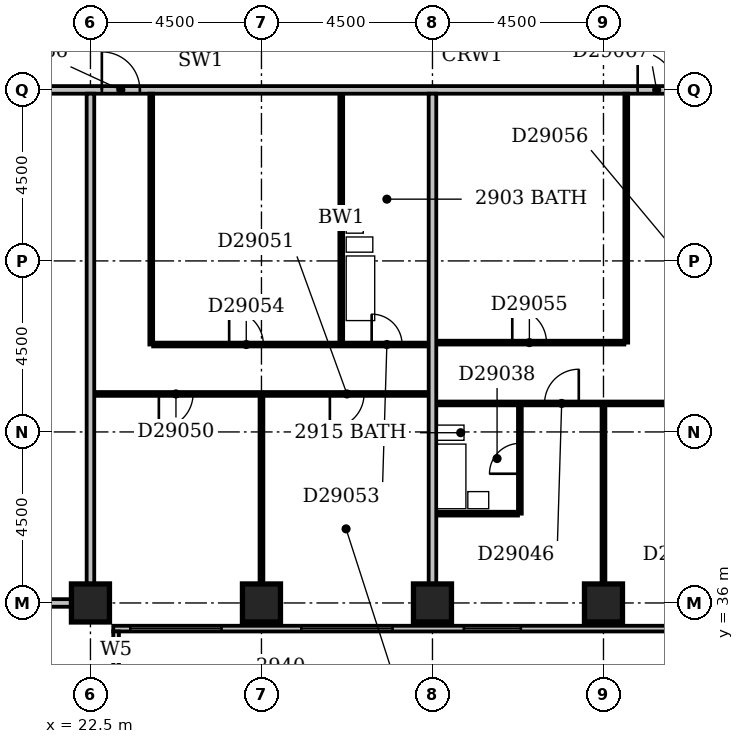
"""IFC4 building model, lengths in metres.
Left out: names, types, materials, properties, quantities, classifications, styles, units other than length and angle.
Written with IfcOpenShell. Run it as: python <this file> out.ifc"""

import sys

from ifc_helpers import new_model, si_unit, direction, frame, frame_2d, origin, origin_2d, place, context, subcontext, project, spatial, rectangle, extrude, element, fill, save


model = new_model("IFC4")
c1 = context("Model", 3, precision=1e-05, world=origin(), true_north=direction((0.0, 1.0)))
c2 = subcontext(c1, "Body", "Model", "MODEL_VIEW")
j1 = project(units=[si_unit("LENGTHUNIT", "METRE"), si_unit("PLANEANGLEUNIT", "RADIAN")], contexts=[c1])
p1 = place(None, origin())
s1 = spatial("IfcSite", under=j1, at=p1, CompositionType="ELEMENT")
p2 = place(p1, origin())
s2 = spatial("IfcBuilding", under=s1, at=p2, CompositionType="ELEMENT")
p3 = place(p2, frame((0.0, 0.0, 119.6)))
s3 = spatial("IfcBuildingStorey", under=s2, at=p3, CompositionType="ELEMENT", Elevation=119.6)
for number, where, z_axis, x_axis in (
    (1, (22.5, 36.0, -0.3), (0.0, 0.0, 1.0), (1.0, 0.0, 0.0)),
    (2, (27.0, 36.0, -0.3), (0.0, 0.0, 1.0), (1.0, 0.0, 0.0)),
    (3, (31.5, 36.0, -0.3), (0.0, 0.0, 1.0), (1.0, 0.0, 0.0)),
    (4, (36.0, 36.0, -0.3), (0.0, 0.0, 1.0), (1.0, 0.0, 0.0)),
):
    element("IfcColumn", number, at=place(p3, frame(where, z_axis=z_axis, x_axis=x_axis)), inside=s3, PredefinedType="COLUMN", context=c2, shape_type="SweptSolid", body=[
        extrude(rectangle(XDim=1.0, YDim=1.0, at=origin_2d()), origin(), (0.0, 0.0, 1.0), 3.6),
    ])
p4 = place(p3, frame((23.175, 17.4, 0.0), z_axis=(0.0, 0.0, 1.0), x_axis=(0.0, 1.0, 0.0)))
e5 = element("IfcWall", 5, at=p4, inside=s3, PredefinedType="STANDARD", context=c2, shape_type="SweptSolid", body=[
    extrude(rectangle(XDim=17.85, YDim=0.15, at=frame_2d((8.925, 0.0))), origin(), (0.0, 0.0, 1.0), 2.7),
])
p5 = place(p4, frame((1.65, 0.0, 0.6)))
e6 = element("IfcOpeningElement", 6, at=p5, cuts=e5, PredefinedType="OPENING", context=c2, shape_type="SweptSolid", body=[
    extrude(rectangle(XDim=2.4, YDim=1.8, at=frame_2d((1.2, 0.9))), frame((0.0, 0.087, 0.0), z_axis=(0.0, -1.0, 0.0), x_axis=(1.0, 0.0, 0.0)), (0.0, 0.0, 1.0), 0.174),
])
p6 = place(p4, frame((6.15, 0.0, 0.6)))
e7 = element("IfcOpeningElement", 7, at=p6, cuts=e5, PredefinedType="OPENING", context=c2, shape_type="SweptSolid", body=[
    extrude(rectangle(XDim=2.4, YDim=1.8, at=frame_2d((1.2, 0.9))), frame((0.0, 0.087, 0.0), z_axis=(0.0, -1.0, 0.0), x_axis=(1.0, 0.0, 0.0)), (0.0, 0.0, 1.0), 0.174),
])
p7 = place(p4, frame((10.65, 0.0, 0.6)))
e8 = element("IfcOpeningElement", 8, at=p7, cuts=e5, PredefinedType="OPENING", context=c2, shape_type="SweptSolid", body=[
    extrude(rectangle(XDim=2.4, YDim=1.8, at=frame_2d((1.2, 0.9))), frame((0.0, 0.087, 0.0), z_axis=(0.0, -1.0, 0.0), x_axis=(1.0, 0.0, 0.0)), (0.0, 0.0, 1.0), 0.174),
])
p8 = place(p4, frame((17.13, 0.0, 0.6)))
e9 = element("IfcOpeningElement", 9, at=p8, cuts=e5, PredefinedType="OPENING", context=c2, shape_type="SweptSolid", body=[
    extrude(rectangle(XDim=0.45, YDim=1.8, at=frame_2d((0.225, 0.9))), frame((0.0, 0.087, 0.0), z_axis=(0.0, -1.0, 0.0), x_axis=(1.0, 0.0, 0.0)), (0.0, 0.0, 1.0), 0.174),
])
p9 = place(p3, frame((23.1, 35.325, 0.0), z_axis=(0.0, 0.0, 1.0), x_axis=(1.0, 0.0, 0.0)))
e10 = element("IfcWall", 10, at=p9, inside=s3, PredefinedType="STANDARD", context=c2, shape_type="SweptSolid", body=[
    extrude(rectangle(XDim=45.15, YDim=0.15, at=frame_2d((22.575, 0.0))), origin(), (0.0, 0.0, 1.0), 2.7),
])
p10 = place(p9, frame((0.45, 0.0, 0.6)))
e11 = element("IfcOpeningElement", 11, at=p10, cuts=e10, PredefinedType="OPENING", context=c2, shape_type="SweptSolid", body=[
    extrude(rectangle(XDim=2.4, YDim=1.8, at=frame_2d((1.2, 0.9))), frame((0.0, 0.087, 0.0), z_axis=(0.0, -1.0, 0.0), x_axis=(1.0, 0.0, 0.0)), (0.0, 0.0, 1.0), 0.174),
])
p11 = place(p9, frame((4.95, 0.0, 0.6)))
e12 = element("IfcOpeningElement", 12, at=p11, cuts=e10, PredefinedType="OPENING", context=c2, shape_type="SweptSolid", body=[
    extrude(rectangle(XDim=2.4, YDim=1.8, at=frame_2d((1.2, 0.9))), frame((0.0, 0.087, 0.0), z_axis=(0.0, -1.0, 0.0), x_axis=(1.0, 0.0, 0.0)), (0.0, 0.0, 1.0), 0.174),
])
p12 = place(p9, frame((9.225, 0.0, 0.6)))
e13 = element("IfcOpeningElement", 13, at=p12, cuts=e10, PredefinedType="OPENING", context=c2, shape_type="SweptSolid", body=[
    extrude(rectangle(XDim=1.5, YDim=1.8, at=frame_2d((0.75, 0.9))), frame((0.0, 0.087, 0.0), z_axis=(0.0, -1.0, 0.0), x_axis=(1.0, 0.0, 0.0)), (0.0, 0.0, 1.0), 0.174),
])
p13 = place(p9, frame((15.146, 0.0, 0.6)))
e14 = element("IfcOpeningElement", 14, at=p13, cuts=e10, PredefinedType="OPENING", context=c2, shape_type="SweptSolid", body=[
    extrude(rectangle(XDim=1.5, YDim=1.8, at=frame_2d((0.75, 0.9))), frame((0.0, 0.087, 0.0), z_axis=(0.0, -1.0, 0.0), x_axis=(1.0, 0.0, 0.0)), (0.0, 0.0, 1.0), 0.174),
])
p14 = place(p9, frame((18.45, 0.0, 0.6)))
e15 = element("IfcOpeningElement", 15, at=p14, cuts=e10, PredefinedType="OPENING", context=c2, shape_type="SweptSolid", body=[
    extrude(rectangle(XDim=2.4, YDim=1.8, at=frame_2d((1.2, 0.9))), frame((0.0, 0.087, 0.0), z_axis=(0.0, -1.0, 0.0), x_axis=(1.0, 0.0, 0.0)), (0.0, 0.0, 1.0), 0.174),
])
p15 = place(p9, frame((22.95, 0.0, 0.6)))
e16 = element("IfcOpeningElement", 16, at=p15, cuts=e10, PredefinedType="OPENING", context=c2, shape_type="SweptSolid", body=[
    extrude(rectangle(XDim=2.4, YDim=1.8, at=frame_2d((1.2, 0.9))), frame((0.0, 0.087, 0.0), z_axis=(0.0, -1.0, 0.0), x_axis=(1.0, 0.0, 0.0)), (0.0, 0.0, 1.0), 0.174),
])
p16 = place(p9, frame((27.45, 0.0, 0.6)))
e17 = element("IfcOpeningElement", 17, at=p16, cuts=e10, PredefinedType="OPENING", context=c2, shape_type="SweptSolid", body=[
    extrude(rectangle(XDim=2.4, YDim=1.8, at=frame_2d((1.2, 0.9))), frame((0.0, 0.087, 0.0), z_axis=(0.0, -1.0, 0.0), x_axis=(1.0, 0.0, 0.0)), (0.0, 0.0, 1.0), 0.174),
])
p17 = place(p9, frame((31.95, 0.0, 0.6)))
e18 = element("IfcOpeningElement", 18, at=p17, cuts=e10, PredefinedType="OPENING", context=c2, shape_type="SweptSolid", body=[
    extrude(rectangle(XDim=2.4, YDim=1.8, at=frame_2d((1.2, 0.9))), frame((0.0, 0.087, 0.0), z_axis=(0.0, -1.0, 0.0), x_axis=(1.0, 0.0, 0.0)), (0.0, 0.0, 1.0), 0.174),
])
p18 = place(p9, frame((36.45, 0.0, 0.6)))
e19 = element("IfcOpeningElement", 19, at=p18, cuts=e10, PredefinedType="OPENING", context=c2, shape_type="SweptSolid", body=[
    extrude(rectangle(XDim=2.4, YDim=1.8, at=frame_2d((1.2, 0.9))), frame((0.0, 0.087, 0.0), z_axis=(0.0, -1.0, 0.0), x_axis=(1.0, 0.0, 0.0)), (0.0, 0.0, 1.0), 0.174),
])
p19 = place(p9, frame((40.631, 0.0, 0.6)))
e20 = element("IfcOpeningElement", 20, at=p19, cuts=e10, PredefinedType="OPENING", context=c2, shape_type="SweptSolid", body=[
    extrude(rectangle(XDim=0.9, YDim=1.8, at=frame_2d((0.45, 0.9))), frame((0.0, 0.087, 0.0), z_axis=(0.0, -1.0, 0.0), x_axis=(1.0, 0.0, 0.0)), (0.0, 0.0, 1.0), 0.174),
])
for number, where, z_axis, x_axis in (
    (21, (9.1, 36.0, 0.0), (0.0, 0.0, 1.0), (1.0, 0.0, 0.0)),
    (22, (22.5, 36.5, 0.0), (0.0, 0.0, 1.0), (0.0, 1.0, 0.0)),
):
    element("IfcWall", number, at=place(p3, frame(where, z_axis=z_axis, x_axis=x_axis)), inside=s3, PredefinedType="PARTITIONING", context=c2, shape_type="SweptSolid", body=[
        extrude(rectangle(XDim=12.9, YDim=0.2, at=frame_2d((6.45, 0.0))), origin(), (0.0, 0.0, 1.0), 3.3),
    ])
p20 = place(p3, frame((27.0, 36.5, 0.0), z_axis=(0.0, 0.0, 1.0), x_axis=(0.0, 1.0, 0.0)))
e23 = element("IfcWall", 23, at=p20, inside=s3, PredefinedType="PARTITIONING", context=c2, shape_type="SweptSolid", body=[
    extrude(rectangle(XDim=4.95, YDim=0.1, at=frame_2d((2.475, 0.0))), origin(), (0.0, 0.0, 1.0), 2.6),
])
p21 = place(p3, frame((31.5, 36.5, 0.0), z_axis=(0.0, 0.0, 1.0), x_axis=(0.0, 1.0, 0.0)))
e24 = element("IfcWall", 24, at=p21, inside=s3, PredefinedType="PARTITIONING", context=c2, shape_type="SweptSolid", body=[
    extrude(rectangle(XDim=12.9, YDim=0.2, at=frame_2d((6.45, 0.0))), origin(), (0.0, 0.0, 1.0), 3.3),
])
p22 = place(p3, frame((36.0, 36.5, 0.0), z_axis=(0.0, 0.0, 1.0), x_axis=(0.0, 1.0, 0.0)))
e25 = element("IfcWall", 25, at=p22, inside=s3, PredefinedType="PARTITIONING", context=c2, shape_type="SweptSolid", body=[
    extrude(rectangle(XDim=4.7, YDim=0.1, at=frame_2d((2.35, 0.0))), origin(), (0.0, 0.0, 1.0), 2.4),
])
p23 = place(p3, frame((31.6, 38.35, 0.0), z_axis=(0.0, 0.0, 1.0), x_axis=(1.0, 0.0, 0.0)))
e26 = element("IfcWall", 26, at=p23, inside=s3, PredefinedType="PLUMBINGWALL", context=c2, shape_type="SweptSolid", body=[
    extrude(rectangle(XDim=2.15, YDim=0.1, at=frame_2d((1.075, 0.0))), origin(), (0.0, 0.0, 1.0), 3.3),
])
p24 = place(p3, frame((33.8, 38.35, 0.0), z_axis=(0.0, 0.0, 1.0), x_axis=(0.0, 1.0, 0.0)))
e27 = element("IfcWall", 27, at=p24, inside=s3, PredefinedType="PLUMBINGWALL", context=c2, shape_type="SweptSolid", body=[
    extrude(rectangle(XDim=2.85, YDim=0.1, at=frame_2d((1.425, 0.0))), origin(), (0.0, 0.0, 1.0), 3.3),
])
p25 = place(p24, frame((1.05, 0.0, 0.0)))
e28 = element("IfcOpeningElement", 28, at=p25, cuts=e27, PredefinedType="OPENING", context=c2, shape_type="SweptSolid", body=[
    extrude(rectangle(XDim=0.8, YDim=2.1, at=frame_2d((0.4, 1.05))), frame((0.0, 0.062, 0.0), z_axis=(0.0, -1.0, 0.0), x_axis=(1.0, 0.0, 0.0)), (0.0, 0.0, 1.0), 0.124),
])
p26 = place(p3, frame((31.6, 41.25, 0.0), z_axis=(0.0, 0.0, 1.0), x_axis=(1.0, 0.0, 0.0)))
e29 = element("IfcWall", 29, at=p26, inside=s3, PredefinedType="PARTITIONING", context=c2, shape_type="SweptSolid", body=[
    extrude(rectangle(XDim=17.8, YDim=0.1, at=frame_2d((8.9, 0.0))), origin(), (0.0, 0.0, 1.0), 3.3),
])
p27 = place(p26, frame((2.85, 0.0, 0.0)))
e30 = element("IfcOpeningElement", 30, at=p27, cuts=e29, PredefinedType="OPENING", context=c2, shape_type="SweptSolid", body=[
    extrude(rectangle(XDim=0.9, YDim=2.1, at=frame_2d((0.45, 1.05))), frame((0.0, 0.062, 0.0), z_axis=(0.0, -1.0, 0.0), x_axis=(1.0, 0.0, 0.0)), (0.0, 0.0, 1.0), 0.124),
])
p28 = place(p26, frame((8.4, 0.0, 0.0)))
e31 = element("IfcOpeningElement", 31, at=p28, cuts=e29, PredefinedType="OPENING", context=c2, shape_type="SweptSolid", body=[
    extrude(rectangle(XDim=0.9, YDim=2.1, at=frame_2d((0.45, 1.05))), frame((0.0, 0.062, 0.0), z_axis=(0.0, -1.0, 0.0), x_axis=(1.0, 0.0, 0.0)), (0.0, 0.0, 1.0), 0.124),
])
p29 = place(p26, frame((14.05, 0.0, 0.0)))
e32 = element("IfcOpeningElement", 32, at=p29, cuts=e29, PredefinedType="OPENING", context=c2, shape_type="SweptSolid", body=[
    extrude(rectangle(XDim=0.9, YDim=2.1, at=frame_2d((0.45, 1.05))), frame((0.0, 0.062, 0.0), z_axis=(0.0, -1.0, 0.0), x_axis=(1.0, 0.0, 0.0)), (0.0, 0.0, 1.0), 0.124),
])
p30 = place(p3, frame((22.6, 41.5, 0.0), z_axis=(0.0, 0.0, 1.0), x_axis=(1.0, 0.0, 0.0)))
e33 = element("IfcWall", 33, at=p30, inside=s3, PredefinedType="PARTITIONING", context=c2, shape_type="SweptSolid", body=[
    extrude(rectangle(XDim=8.8, YDim=0.1, at=frame_2d((4.4, 0.0))), origin(), (0.0, 0.0, 1.0), 3.3),
])
p31 = place(p30, frame((1.7, 0.0, 0.0)))
e34 = element("IfcOpeningElement", 34, at=p31, cuts=e33, PredefinedType="OPENING", context=c2, shape_type="SweptSolid", body=[
    extrude(rectangle(XDim=0.9, YDim=2.1, at=frame_2d((0.45, 1.05))), frame((0.0, 0.062, 0.0), z_axis=(0.0, -1.0, 0.0), x_axis=(1.0, 0.0, 0.0)), (0.0, 0.0, 1.0), 0.124),
])
p32 = place(p30, frame((6.2, 0.0, 0.0)))
e35 = element("IfcOpeningElement", 35, at=p32, cuts=e33, PredefinedType="OPENING", context=c2, shape_type="SweptSolid", body=[
    extrude(rectangle(XDim=0.9, YDim=2.1, at=frame_2d((0.45, 1.05))), frame((0.0, 0.062, 0.0), z_axis=(0.0, -1.0, 0.0), x_axis=(1.0, 0.0, 0.0)), (0.0, 0.0, 1.0), 0.124),
])
p33 = place(p3, frame((24.1, 42.8, 0.0), z_axis=(0.0, 0.0, 1.0), x_axis=(0.0, 1.0, 0.0)))
e36 = element("IfcWall", 36, at=p33, inside=s3, PredefinedType="PARTITIONING", context=c2, shape_type="SweptSolid", body=[
    extrude(rectangle(XDim=6.6, YDim=0.1, at=frame_2d((3.3, 0.0))), origin(), (0.0, 0.0, 1.0), 3.3),
])
p34 = place(p3, frame((24.15, 42.8, 0.0), z_axis=(0.0, 0.0, 1.0), x_axis=(1.0, 0.0, 0.0)))
e37 = element("IfcWall", 37, at=p34, inside=s3, PredefinedType="PARTITIONING", context=c2, shape_type="SweptSolid", body=[
    extrude(rectangle(XDim=7.25, YDim=0.1, at=frame_2d((3.625, 0.0))), origin(), (0.0, 0.0, 1.0), 3.3),
])
p35 = place(p34, frame((5.75, 0.0, 0.0)))
e38 = element("IfcOpeningElement", 38, at=p35, cuts=e37, PredefinedType="OPENING", context=c2, shape_type="SweptSolid", body=[
    extrude(rectangle(XDim=0.8, YDim=2.1, at=frame_2d((0.4, 1.05))), frame((0.0, 0.062, 0.0), z_axis=(0.0, -1.0, 0.0), x_axis=(1.0, 0.0, 0.0)), (0.0, 0.0, 1.0), 0.124),
])
p36 = place(p34, frame((2.0, 0.0, 0.0)))
e39 = element("IfcOpeningElement", 39, at=p36, cuts=e37, PredefinedType="OPENING", context=c2, shape_type="SweptSolid", body=[
    extrude(rectangle(XDim=0.9, YDim=2.1, at=frame_2d((0.45, 1.05))), frame((0.0, 0.062, 0.0), z_axis=(0.0, -1.0, 0.0), x_axis=(1.0, 0.0, 0.0)), (0.0, 0.0, 1.0), 0.124),
])
p37 = place(p3, frame((29.1, 42.85, 0.0), z_axis=(0.0, 0.0, 1.0), x_axis=(0.0, 1.0, 0.0)))
e40 = element("IfcWall", 40, at=p37, inside=s3, PredefinedType="PLUMBINGWALL", context=c2, shape_type="SweptSolid", body=[
    extrude(rectangle(XDim=6.55, YDim=0.1, at=frame_2d((3.275, 0.0))), origin(), (0.0, 0.0, 1.0), 3.3),
])
p38 = place(p3, frame((31.6, 42.85, 0.0), z_axis=(0.0, 0.0, 1.0), x_axis=(1.0, 0.0, 0.0)))
e41 = element("IfcWall", 41, at=p38, inside=s3, PredefinedType="PARTITIONING", context=c2, shape_type="SweptSolid", body=[
    extrude(rectangle(XDim=4.95, YDim=0.1, at=frame_2d((2.475, 0.0))), origin(), (0.0, 0.0, 1.0), 3.3),
])
p39 = place(p38, frame((2.0, 0.0, 0.0)))
e42 = element("IfcOpeningElement", 42, at=p39, cuts=e41, PredefinedType="OPENING", context=c2, shape_type="SweptSolid", body=[
    extrude(rectangle(XDim=0.9, YDim=2.1, at=frame_2d((0.45, 1.05))), frame((0.0, 0.062, 0.0), z_axis=(0.0, -1.0, 0.0), x_axis=(1.0, 0.0, 0.0)), (0.0, 0.0, 1.0), 0.124),
])
p40 = place(p3, frame((36.6, 42.85, 0.0), z_axis=(0.0, 0.0, 1.0), x_axis=(0.0, 1.0, 0.0)))
e43 = element("IfcWall", 43, at=p40, inside=s3, PredefinedType="PARTITIONING", context=c2, shape_type="SweptSolid", body=[
    extrude(rectangle(XDim=6.55, YDim=0.1, at=frame_2d((3.275, 0.0))), origin(), (0.0, 0.0, 1.0), 2.4),
])
p41 = place(p3, frame((9.1, 49.5, 0.0), z_axis=(0.0, 0.0, 1.0), x_axis=(1.0, 0.0, 0.0)))
e44 = element("IfcWall", 44, at=p41, inside=s3, PredefinedType="PARTITIONING", context=c2, shape_type="SweptSolid", body=[
    extrude(rectangle(XDim=41.55, YDim=0.2, at=frame_2d((20.775, 0.0))), origin(), (0.0, 0.0, 1.0), 3.3),
])
p42 = place(p41, frame((13.7, 0.0, 0.0)))
e45 = element("IfcOpeningElement", 45, at=p42, cuts=e44, PredefinedType="OPENING", context=c2, shape_type="SweptSolid", body=[
    extrude(rectangle(XDim=1.0, YDim=2.1, at=frame_2d((0.5, 1.05))), frame((0.0, 0.112, 0.0), z_axis=(0.0, -1.0, 0.0), x_axis=(1.0, 0.0, 0.0)), (0.0, 0.0, 1.0), 0.224),
])
p43 = place(p41, frame((27.8, 0.0, 0.0)))
e46 = element("IfcOpeningElement", 46, at=p43, cuts=e44, PredefinedType="OPENING", context=c2, shape_type="SweptSolid", body=[
    extrude(rectangle(XDim=1.0, YDim=2.1, at=frame_2d((0.5, 1.05))), frame((0.0, 0.112, 0.0), z_axis=(0.0, -1.0, 0.0), x_axis=(1.0, 0.0, 0.0)), (0.0, 0.0, 1.0), 0.224),
])
p44 = place(p41, frame((8.4, 0.0, 0.0)))
e47 = element("IfcOpeningElement", 47, at=p44, cuts=e44, PredefinedType="OPENING", context=c2, shape_type="SweptSolid", body=[
    extrude(rectangle(XDim=0.9, YDim=2.1, at=frame_2d((0.45, 1.05))), frame((0.0, 0.112, 0.0), z_axis=(0.0, -1.0, 0.0), x_axis=(1.0, 0.0, 0.0)), (0.0, 0.0, 1.0), 0.224),
])
p45 = place(p8, origin())
e48 = element("IfcWindow", 48, at=p45, inside=s3, PartitioningType="SINGLE_PANEL", PredefinedType="WINDOW", context=c2, shape_type="SweptSolid", body=[
    extrude(rectangle(XDim=0.45, YDim=1.8, at=frame_2d((0.225, 0.9))), frame((0.0, 0.03, 0.0), z_axis=(0.0, -1.0, 0.0), x_axis=(1.0, 0.0, 0.0)), (0.0, 0.0, 1.0), 0.06),
])
fill(e9, e48)
p46 = place(p10, origin())
e49 = element("IfcWindow", 49, at=p46, inside=s3, PartitioningType="SINGLE_PANEL", PredefinedType="WINDOW", context=c2, shape_type="SweptSolid", body=[
    extrude(rectangle(XDim=2.4, YDim=1.8, at=frame_2d((1.2, 0.9))), frame((0.0, 0.03, 0.0), z_axis=(0.0, -1.0, 0.0), x_axis=(1.0, 0.0, 0.0)), (0.0, 0.0, 1.0), 0.06),
])
fill(e11, e49)
p47 = place(p11, origin())
e50 = element("IfcWindow", 50, at=p47, inside=s3, PartitioningType="SINGLE_PANEL", PredefinedType="WINDOW", context=c2, shape_type="SweptSolid", body=[
    extrude(rectangle(XDim=2.4, YDim=1.8, at=frame_2d((1.2, 0.9))), frame((0.0, 0.03, 0.0), z_axis=(0.0, -1.0, 0.0), x_axis=(1.0, 0.0, 0.0)), (0.0, 0.0, 1.0), 0.06),
])
fill(e12, e50)
p48 = place(p12, origin())
e51 = element("IfcWindow", 51, at=p48, inside=s3, PartitioningType="SINGLE_PANEL", PredefinedType="WINDOW", context=c2, shape_type="SweptSolid", body=[
    extrude(rectangle(XDim=1.5, YDim=1.8, at=frame_2d((0.75, 0.9))), frame((0.0, 0.03, 0.0), z_axis=(0.0, -1.0, 0.0), x_axis=(1.0, 0.0, 0.0)), (0.0, 0.0, 1.0), 0.06),
])
fill(e13, e51)
p49 = place(p25, origin())
e52 = element("IfcDoor", 52, at=p49, inside=s3, OperationType="SINGLE_SWING_LEFT", PredefinedType="DOOR", context=c2, shape_type="SweptSolid", body=[
    extrude(rectangle(XDim=0.8, YDim=2.1, at=frame_2d((0.4, 1.05))), frame((0.0, 0.025, 0.0), z_axis=(0.0, -1.0, 0.0), x_axis=(1.0, 0.0, 0.0)), (0.0, 0.0, 1.0), 0.05),
])
fill(e28, e52)
p50 = place(p27, frame((0.9, 0.0, 0.0), z_axis=(0.0, 0.0, 1.0), x_axis=(-1.0, 0.0, 0.0)))
e53 = element("IfcDoor", 53, at=p50, inside=s3, OperationType="SINGLE_SWING_LEFT", PredefinedType="DOOR", context=c2, shape_type="SweptSolid", body=[
    extrude(rectangle(XDim=0.9, YDim=2.1, at=frame_2d((0.45, 1.05))), frame((0.0, 0.025, 0.0), z_axis=(0.0, -1.0, 0.0), x_axis=(1.0, 0.0, 0.0)), (0.0, 0.0, 1.0), 0.05),
])
fill(e30, e53)
p51 = place(p31, frame((0.9, 0.0, 0.0), z_axis=(0.0, 0.0, 1.0), x_axis=(-1.0, 0.0, 0.0)))
e54 = element("IfcDoor", 54, at=p51, inside=s3, OperationType="SINGLE_SWING_RIGHT", PredefinedType="DOOR", context=c2, shape_type="SweptSolid", body=[
    extrude(rectangle(XDim=0.9, YDim=2.1, at=frame_2d((0.45, 1.05))), frame((0.0, 0.025, 0.0), z_axis=(0.0, -1.0, 0.0), x_axis=(1.0, 0.0, 0.0)), (0.0, 0.0, 1.0), 0.05),
])
fill(e34, e54)
p52 = place(p32, frame((0.9, 0.0, 0.0), z_axis=(0.0, 0.0, 1.0), x_axis=(-1.0, 0.0, 0.0)))
e55 = element("IfcDoor", 55, at=p52, inside=s3, OperationType="SINGLE_SWING_RIGHT", PredefinedType="DOOR", context=c2, shape_type="SweptSolid", body=[
    extrude(rectangle(XDim=0.9, YDim=2.1, at=frame_2d((0.45, 1.05))), frame((0.0, 0.025, 0.0), z_axis=(0.0, -1.0, 0.0), x_axis=(1.0, 0.0, 0.0)), (0.0, 0.0, 1.0), 0.05),
])
fill(e35, e55)
p53 = place(p35, origin())
e56 = element("IfcDoor", 56, at=p53, inside=s3, OperationType="SINGLE_SWING_LEFT", PredefinedType="DOOR", context=c2, shape_type="SweptSolid", body=[
    extrude(rectangle(XDim=0.8, YDim=2.1, at=frame_2d((0.4, 1.05))), frame((0.0, 0.025, 0.0), z_axis=(0.0, -1.0, 0.0), x_axis=(1.0, 0.0, 0.0)), (0.0, 0.0, 1.0), 0.05),
])
fill(e38, e56)
p54 = place(p36, origin())
e57 = element("IfcDoor", 57, at=p54, inside=s3, OperationType="SINGLE_SWING_LEFT", PredefinedType="DOOR", context=c2, shape_type="SweptSolid", body=[
    extrude(rectangle(XDim=0.9, YDim=2.1, at=frame_2d((0.45, 1.05))), frame((0.0, 0.025, 0.0), z_axis=(0.0, -1.0, 0.0), x_axis=(1.0, 0.0, 0.0)), (0.0, 0.0, 1.0), 0.05),
])
fill(e39, e57)
p55 = place(p39, origin())
e58 = element("IfcDoor", 58, at=p55, inside=s3, OperationType="SINGLE_SWING_LEFT", PredefinedType="DOOR", context=c2, shape_type="SweptSolid", body=[
    extrude(rectangle(XDim=0.9, YDim=2.1, at=frame_2d((0.45, 1.05))), frame((0.0, 0.025, 0.0), z_axis=(0.0, -1.0, 0.0), x_axis=(1.0, 0.0, 0.0)), (0.0, 0.0, 1.0), 0.05),
])
fill(e42, e58)
p56 = place(p42, origin())
e59 = element("IfcDoor", 59, at=p56, inside=s3, OperationType="SINGLE_SWING_LEFT", PredefinedType="DOOR", context=c2, shape_type="SweptSolid", body=[
    extrude(rectangle(XDim=1.0, YDim=2.1, at=frame_2d((0.5, 1.05))), frame((0.0, 0.025, 0.0), z_axis=(0.0, -1.0, 0.0), x_axis=(1.0, 0.0, 0.0)), (0.0, 0.0, 1.0), 0.05),
])
fill(e45, e59)
p57 = place(p43, origin())
e60 = element("IfcDoor", 60, at=p57, inside=s3, OperationType="SINGLE_SWING_LEFT", PredefinedType="DOOR", context=c2, shape_type="SweptSolid", body=[
    extrude(rectangle(XDim=1.0, YDim=2.1, at=frame_2d((0.5, 1.05))), frame((0.0, 0.025, 0.0), z_axis=(0.0, -1.0, 0.0), x_axis=(1.0, 0.0, 0.0)), (0.0, 0.0, 1.0), 0.05),
])
fill(e46, e60)
save(model, sys.argv[1])
